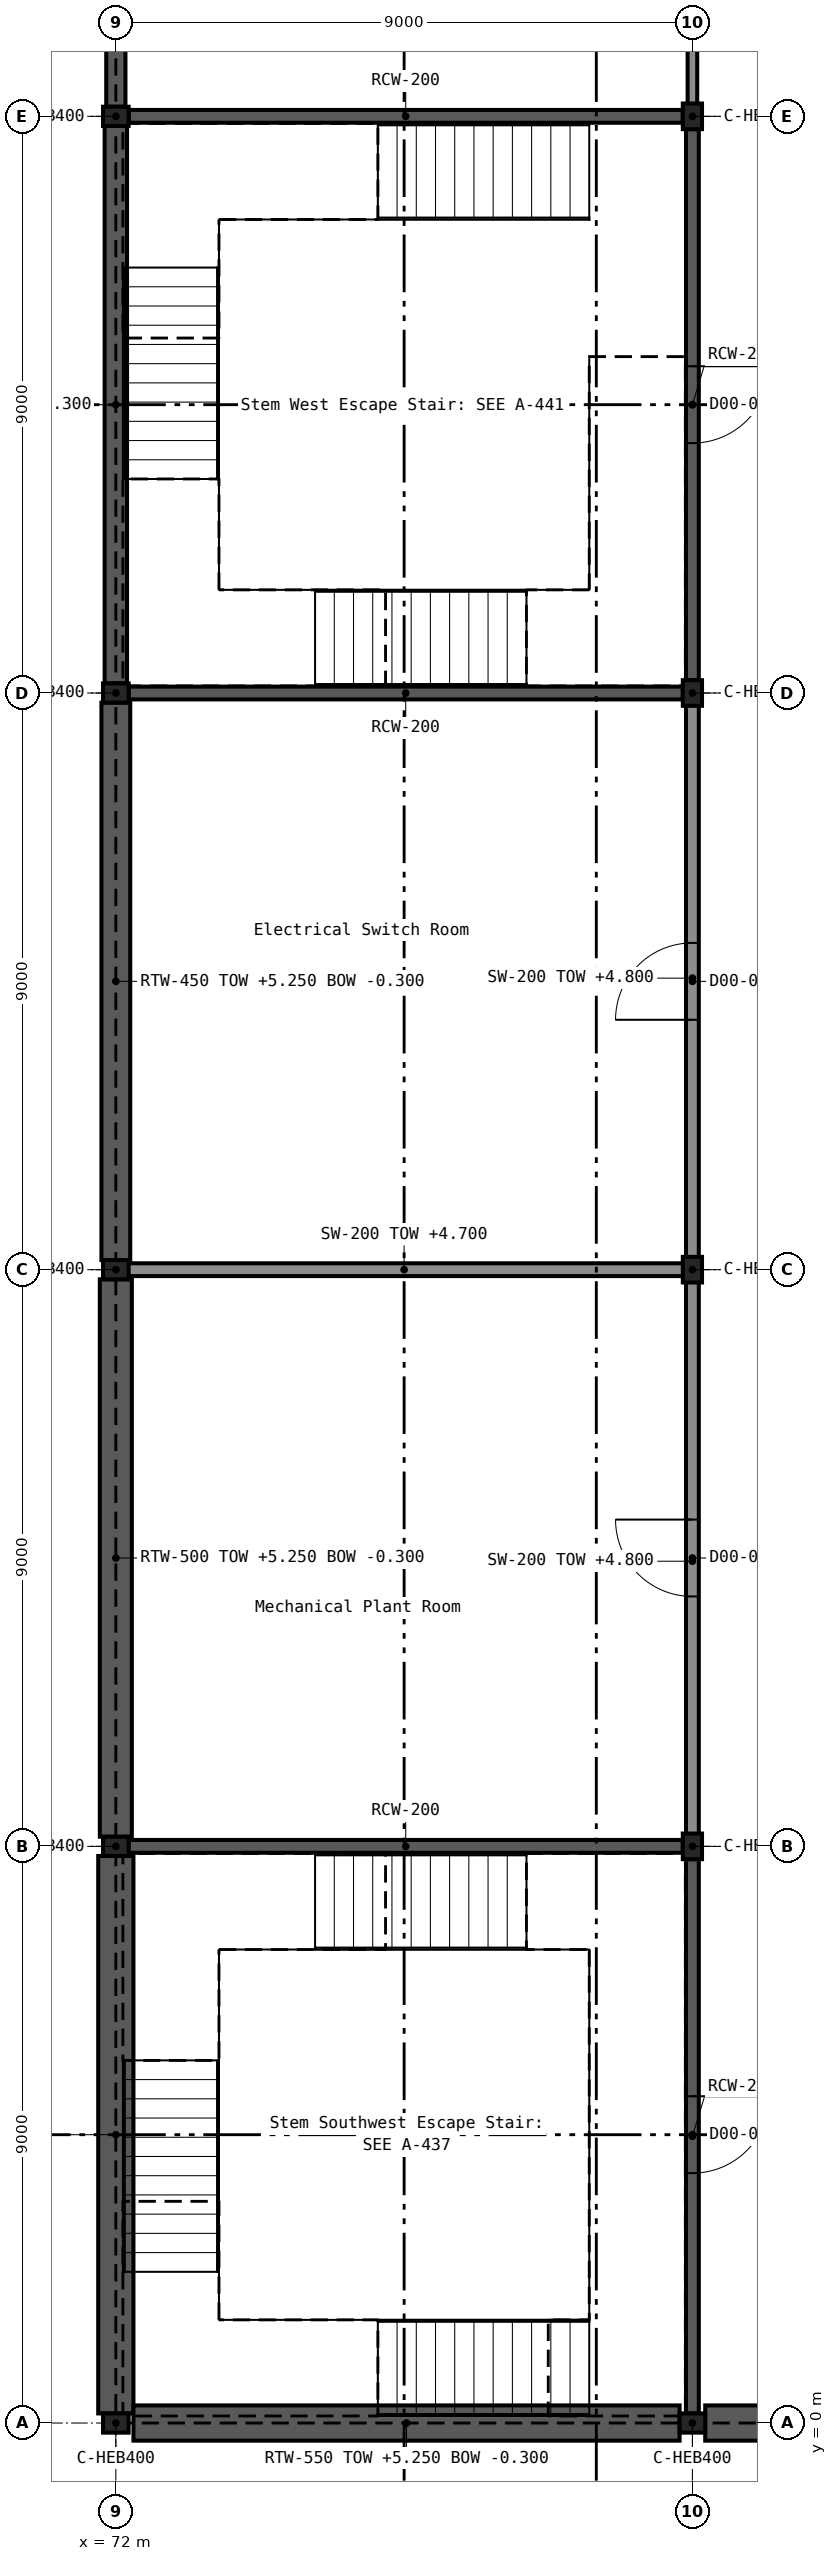
"""IFC4 building model, lengths in metres.
Left out: names, types, materials, properties, quantities, classifications, styles, units other than length and angle.
Written with IfcOpenShell. Run it as: python <this file> out.ifc"""

import sys

from ifc_helpers import new_model, si_unit, direction, frame, frame_2d, origin, origin_2d, place, context, subcontext, project, spatial, rectangle, i_section, extrude, element, fill, save


model = new_model("IFC4")
c1 = context("Model", 3, precision=1e-05, world=origin(), true_north=direction((0.0, 1.0)))
c2 = subcontext(c1, "Body", "Model", "MODEL_VIEW")
j1 = project(units=[si_unit("LENGTHUNIT", "METRE"), si_unit("PLANEANGLEUNIT", "RADIAN")], contexts=[c1])
p1 = place(None, origin())
s1 = spatial("IfcSite", under=j1, at=p1, CompositionType="ELEMENT")
p2 = place(p1, origin())
s2 = spatial("IfcBuilding", under=s1, at=p2, CompositionType="ELEMENT")
p3 = place(p2, origin())
s3 = spatial("IfcBuildingStorey", under=s2, at=p3, CompositionType="ELEMENT", Elevation=0.0)
for number, where, z_axis, x_axis in (
    (1, (72.0, 0.0, -0.3), (0.0, 0.0, 1.0), (0.0, 1.0, 0.0)),
    (2, (81.0, 0.0, -0.3), (0.0, 0.0, 1.0), (0.0, 1.0, 0.0)),
    (3, (72.0, 9.0, -0.3), (0.0, 0.0, 1.0), (0.0, 1.0, 0.0)),
    (4, (81.0, 9.0, -0.3), (0.0, 0.0, 1.0), (1.0, 0.0, 0.0)),
    (5, (72.0, 18.0, -0.3), (0.0, 0.0, 1.0), (0.0, 1.0, 0.0)),
    (6, (81.0, 18.0, -0.3), (0.0, 0.0, 1.0), (1.0, 0.0, 0.0)),
    (7, (72.0, 27.0, -0.3), (0.0, 0.0, 1.0), (0.0, 1.0, 0.0)),
    (8, (81.0, 27.0, -0.3), (0.0, 0.0, 1.0), (1.0, 0.0, 0.0)),
    (9, (72.0, 36.0, -0.3), (0.0, 0.0, 1.0), (0.0, 1.0, 0.0)),
    (10, (81.0, 36.0, -0.3), (0.0, 0.0, 1.0), (1.0, 0.0, 0.0)),
):
    element("IfcColumn", number, at=place(p3, frame(where, z_axis=z_axis, x_axis=x_axis)), inside=s3, PredefinedType="COLUMN", context=c2, shape_type="SweptSolid", body=[
        extrude(i_section(OverallWidth=0.3, OverallDepth=0.4, WebThickness=0.013, FlangeThickness=0.024, FilletRadius=0.027, at=origin_2d()), origin(), (0.0, 0.0, 1.0), 5.7),
    ])
p4 = place(p3, frame((72.0, 0.15, -0.3), z_axis=(0.0, 0.0, 1.0), x_axis=(0.0, 1.0, 0.0)))
e11 = element("IfcWall", 11, at=p4, inside=s3, PredefinedType="SOLIDWALL", context=c2, shape_type="SweptSolid", body=[
    extrude(rectangle(XDim=8.7, YDim=0.55, at=frame_2d((4.35, 0.0))), origin(), (0.0, 0.0, 1.0), 5.55),
])
p5 = place(p3, frame((72.0, 9.15, -0.3), z_axis=(0.0, 0.0, 1.0), x_axis=(0.0, 1.0, 0.0)))
e12 = element("IfcWall", 12, at=p5, inside=s3, PredefinedType="SOLIDWALL", context=c2, shape_type="SweptSolid", body=[
    extrude(rectangle(XDim=8.7, YDim=0.5, at=frame_2d((4.35, 0.0))), origin(), (0.0, 0.0, 1.0), 5.55),
])
p6 = place(p3, frame((72.0, 18.15, -0.3), z_axis=(0.0, 0.0, 1.0), x_axis=(0.0, 1.0, 0.0)))
e13 = element("IfcWall", 13, at=p6, inside=s3, PredefinedType="SOLIDWALL", context=c2, shape_type="SweptSolid", body=[
    extrude(rectangle(XDim=8.7, YDim=0.45, at=frame_2d((4.35, 0.0))), origin(), (0.0, 0.0, 1.0), 5.55),
])
p7 = place(p3, frame((72.0, 27.15, -0.3), z_axis=(0.0, 0.0, 1.0), x_axis=(0.0, 1.0, 0.0)))
e14 = element("IfcWall", 14, at=p7, inside=s3, PredefinedType="SOLIDWALL", context=c2, shape_type="SweptSolid", body=[
    extrude(rectangle(XDim=8.7, YDim=0.35, at=frame_2d((4.35, 0.0))), origin(), (0.0, 0.0, 1.0), 5.55),
])
p8 = place(p3, frame((72.0, 36.15, -0.3), z_axis=(0.0, 0.0, 1.0), x_axis=(0.0, 1.0, 0.0)))
e15 = element("IfcWall", 15, at=p8, inside=s3, PredefinedType="SOLIDWALL", context=c2, shape_type="SweptSolid", body=[
    extrude(rectangle(XDim=8.7, YDim=0.3, at=frame_2d((4.35, 0.0))), origin(), (0.0, 0.0, 1.0), 5.55),
])
p9 = place(p3, frame((72.275, 0.0, -0.3), z_axis=(0.0, 0.0, 1.0), x_axis=(1.0, 0.0, 0.0)))
e16 = element("IfcWall", 16, at=p9, inside=s3, PredefinedType="SOLIDWALL", context=c2, shape_type="SweptSolid", body=[
    extrude(rectangle(XDim=8.525, YDim=0.55, at=frame_2d((4.263, 0.0))), origin(), (0.0, 0.0, 1.0), 5.55),
])
p10 = place(p3, frame((81.2, 0.0, -0.3), z_axis=(0.0, 0.0, 1.0), x_axis=(1.0, 0.0, 0.0)))
e17 = element("IfcWall", 17, at=p10, inside=s3, PredefinedType="SOLIDWALL", context=c2, shape_type="SweptSolid", body=[
    extrude(rectangle(XDim=8.6, YDim=0.55, at=frame_2d((4.3, 0.0))), origin(), (0.0, 0.0, 1.0), 5.55),
])
p11 = place(p3, frame((72.2, 9.0, 0.0), z_axis=(0.0, 0.0, 1.0), x_axis=(1.0, 0.0, 0.0)))
e18 = element("IfcWall", 18, at=p11, inside=s3, PredefinedType="SHEAR", context=c2, shape_type="SweptSolid", body=[
    extrude(rectangle(XDim=8.65, YDim=0.2, at=frame_2d((4.325, 0.0))), origin(), (0.0, 0.0, 1.0), 5.4),
])
p12 = place(p3, frame((81.0, 0.15, 0.0), z_axis=(0.0, 0.0, 1.0), x_axis=(0.0, 1.0, 0.0)))
e19 = element("IfcWall", 19, at=p12, inside=s3, PredefinedType="SHEAR", context=c2, shape_type="SweptSolid", body=[
    extrude(rectangle(XDim=8.65, YDim=0.2, at=frame_2d((4.325, 0.0))), origin(), (0.0, 0.0, 1.0), 5.4),
])
p13 = place(p12, frame((3.75, 0.0, 0.0)))
e20 = element("IfcOpeningElement", 20, at=p13, cuts=e19, PredefinedType="OPENING", context=c2, shape_type="SweptSolid", body=[
    extrude(rectangle(XDim=1.2, YDim=2.1, at=frame_2d((0.6, 1.05))), frame((0.0, 0.111, 0.0), z_axis=(0.0, -1.0, 0.0), x_axis=(1.0, 0.0, 0.0)), (0.0, 0.0, 1.0), 0.222),
])
for number, where, z_axis, x_axis in (
    (21, (72.2, 27.0, 0.0), (0.0, 0.0, 1.0), (1.0, 0.0, 0.0)),
    (22, (72.2, 36.0, 0.0), (0.0, 0.0, 1.0), (1.0, 0.0, 0.0)),
):
    element("IfcWall", number, at=place(p3, frame(where, z_axis=z_axis, x_axis=x_axis)), inside=s3, PredefinedType="SHEAR", context=c2, shape_type="SweptSolid", body=[
        extrude(rectangle(XDim=8.65, YDim=0.2, at=frame_2d((4.325, 0.0))), origin(), (0.0, 0.0, 1.0), 5.4),
    ])
p14 = place(p3, frame((81.0, 27.2, 0.0), z_axis=(0.0, 0.0, 1.0), x_axis=(0.0, 1.0, 0.0)))
e23 = element("IfcWall", 23, at=p14, inside=s3, PredefinedType="SHEAR", context=c2, shape_type="SweptSolid", body=[
    extrude(rectangle(XDim=8.6, YDim=0.2, at=frame_2d((4.3, 0.0))), origin(), (0.0, 0.0, 1.0), 5.4),
])
p15 = place(p14, frame((3.7, 0.0, 0.0)))
e24 = element("IfcOpeningElement", 24, at=p15, cuts=e23, PredefinedType="OPENING", context=c2, shape_type="SweptSolid", body=[
    extrude(rectangle(XDim=1.2, YDim=2.1, at=frame_2d((0.6, 1.05))), frame((0.0, 0.111, 0.0), z_axis=(0.0, -1.0, 0.0), x_axis=(1.0, 0.0, 0.0)), (0.0, 0.0, 1.0), 0.222),
])
p16 = place(p3, frame((72.0, 18.0, 0.0), z_axis=(0.0, 0.0, 1.0), x_axis=(1.0, 0.0, 0.0)))
e25 = element("IfcWall", 25, at=p16, inside=s3, PredefinedType="SOLIDWALL", context=c2, shape_type="SweptSolid", body=[
    extrude(rectangle(XDim=9.0, YDim=0.2, at=frame_2d((4.5, 0.0))), origin(), (0.0, 0.0, 1.0), 4.7),
])
p17 = place(p3, frame((81.0, 9.0, 0.0), z_axis=(0.0, 0.0, 1.0), x_axis=(0.0, 1.0, 0.0)))
e26 = element("IfcWall", 26, at=p17, inside=s3, PredefinedType="SOLIDWALL", context=c2, shape_type="SweptSolid", body=[
    extrude(rectangle(XDim=8.9, YDim=0.2, at=frame_2d((4.45, 0.0))), origin(), (0.0, 0.0, 1.0), 4.8),
])
p18 = place(p17, frame((3.9, 0.0, 0.0)))
e27 = element("IfcOpeningElement", 27, at=p18, cuts=e26, PredefinedType="OPENING", context=c2, shape_type="SweptSolid", body=[
    extrude(rectangle(XDim=1.2, YDim=2.4, at=frame_2d((0.6, 1.2))), frame((0.0, 0.111, 0.0), z_axis=(0.0, -1.0, 0.0), x_axis=(1.0, 0.0, 0.0)), (0.0, 0.0, 1.0), 0.222),
])
p19 = place(p3, frame((81.0, 18.1, 0.0), z_axis=(0.0, 0.0, 1.0), x_axis=(0.0, 1.0, 0.0)))
e28 = element("IfcWall", 28, at=p19, inside=s3, PredefinedType="SOLIDWALL", context=c2, shape_type="SweptSolid", body=[
    extrude(rectangle(XDim=8.9, YDim=0.2, at=frame_2d((4.45, 0.0))), origin(), (0.0, 0.0, 1.0), 4.8),
])
p20 = place(p19, frame((3.8, 0.0, 0.0)))
e29 = element("IfcOpeningElement", 29, at=p20, cuts=e28, PredefinedType="OPENING", context=c2, shape_type="SweptSolid", body=[
    extrude(rectangle(XDim=1.2, YDim=2.4, at=frame_2d((0.6, 1.2))), frame((0.0, 0.111, 0.0), z_axis=(0.0, -1.0, 0.0), x_axis=(1.0, 0.0, 0.0)), (0.0, 0.0, 1.0), 0.222),
])
p21 = place(p3, frame((81.0, 36.0, 0.0), z_axis=(0.0, 0.0, 1.0), x_axis=(0.0, 1.0, 0.0)))
e30 = element("IfcWall", 30, at=p21, inside=s3, PredefinedType="PARTITIONING", context=c2, shape_type="SweptSolid", body=[
    extrude(rectangle(XDim=9.0, YDim=0.15, at=frame_2d((4.5, 0.0))), origin(), (0.0, 0.0, 1.0), 4.8),
])
p22 = place(p21, frame((3.6, 0.0, 0.0)))
e31 = element("IfcOpeningElement", 31, at=p22, cuts=e30, PredefinedType="OPENING", context=c2, shape_type="SweptSolid", body=[
    extrude(rectangle(XDim=1.8, YDim=2.1, at=frame_2d((0.9, 1.05))), frame((0.0, 0.086, 0.0), z_axis=(0.0, -1.0, 0.0), x_axis=(1.0, 0.0, 0.0)), (0.0, 0.0, 1.0), 0.172),
])
p23 = place(p13, frame((1.2, 0.0, 0.0), z_axis=(0.0, 0.0, 1.0), x_axis=(-1.0, 0.0, 0.0)))
e32 = element("IfcDoor", 32, at=p23, inside=s3, OperationType="SINGLE_SWING_LEFT", PredefinedType="DOOR", context=c2, shape_type="SweptSolid", body=[
    extrude(rectangle(XDim=1.2, YDim=2.1, at=frame_2d((0.6, 1.05))), frame((0.0, 0.025, 0.0), z_axis=(0.0, -1.0, 0.0), x_axis=(1.0, 0.0, 0.0)), (0.0, 0.0, 1.0), 0.05),
])
fill(e20, e32)
p24 = place(p15, frame((1.2, 0.0, 0.0), z_axis=(0.0, 0.0, 1.0), x_axis=(-1.0, 0.0, 0.0)))
e33 = element("IfcDoor", 33, at=p24, inside=s3, OperationType="SINGLE_SWING_LEFT", PredefinedType="DOOR", context=c2, shape_type="SweptSolid", body=[
    extrude(rectangle(XDim=1.2, YDim=2.1, at=frame_2d((0.6, 1.05))), frame((0.0, 0.025, 0.0), z_axis=(0.0, -1.0, 0.0), x_axis=(1.0, 0.0, 0.0)), (0.0, 0.0, 1.0), 0.05),
])
fill(e24, e33)
p25 = place(p18, origin())
e34 = element("IfcDoor", 34, at=p25, inside=s3, OperationType="SINGLE_SWING_RIGHT", PredefinedType="DOOR", context=c2, shape_type="SweptSolid", body=[
    extrude(rectangle(XDim=1.2, YDim=2.4, at=frame_2d((0.6, 1.2))), frame((0.0, 0.025, 0.0), z_axis=(0.0, -1.0, 0.0), x_axis=(1.0, 0.0, 0.0)), (0.0, 0.0, 1.0), 0.05),
])
fill(e27, e34)
p26 = place(p20, origin())
e35 = element("IfcDoor", 35, at=p26, inside=s3, OperationType="SINGLE_SWING_LEFT", PredefinedType="DOOR", context=c2, shape_type="SweptSolid", body=[
    extrude(rectangle(XDim=1.2, YDim=2.4, at=frame_2d((0.6, 1.2))), frame((0.0, 0.025, 0.0), z_axis=(0.0, -1.0, 0.0), x_axis=(1.0, 0.0, 0.0)), (0.0, 0.0, 1.0), 0.05),
])
fill(e29, e35)
save(model, sys.argv[1])
